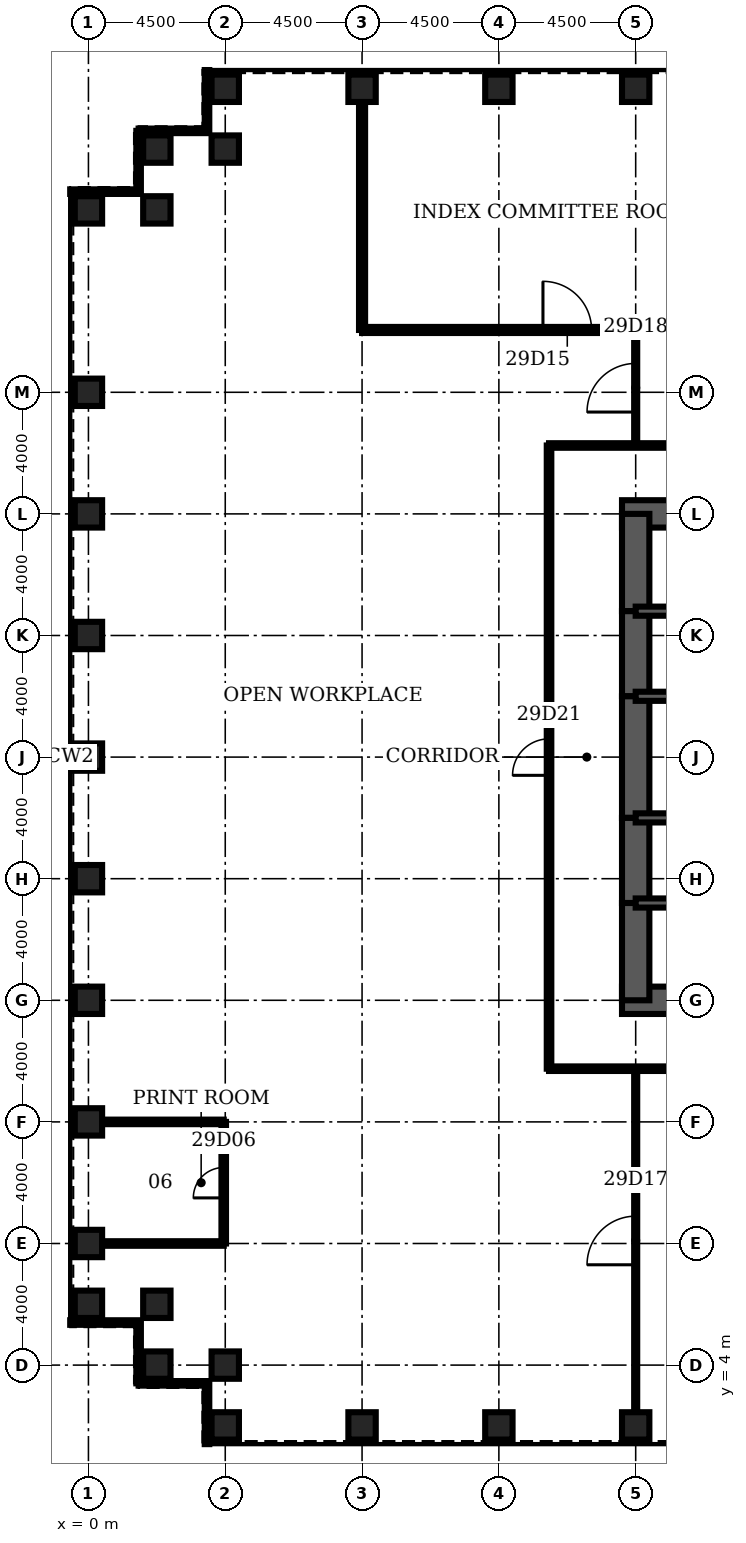
"""IFC4 building model, lengths in metres.
Left out: names, types, materials, properties, quantities, classifications, styles, units other than length and angle.
Written with IfcOpenShell. Run it as: python <this file> out.ifc"""

import sys

from ifc_helpers import new_model, si_unit, direction, frame, frame_2d, origin, origin_2d, place, context, subcontext, project, spatial, rectangle, hollow_rectangle, extrude, element, fill, save


model = new_model("IFC4")
c1 = context("Model", 3, precision=1e-05, world=origin(), true_north=direction((0.0, 1.0)))
c2 = subcontext(c1, "Body", "Model", "MODEL_VIEW")
j1 = project(units=[si_unit("LENGTHUNIT", "METRE"), si_unit("PLANEANGLEUNIT", "RADIAN")], contexts=[c1])
p1 = place(None, origin())
s1 = spatial("IfcSite", under=j1, at=p1, CompositionType="ELEMENT")
p2 = place(p1, origin())
s2 = spatial("IfcBuilding", under=s1, at=p2, CompositionType="ELEMENT")
p3 = place(p2, frame((0.0, 0.0, 134.1)))
s3 = spatial("IfcBuildingStorey", under=s2, at=p3, CompositionType="ELEMENT", Elevation=134.1)
for number, where, z_axis, x_axis in (
    (1, (4.5, 2.0, 0.0), (0.0, 0.0, 1.0), (0.0, 1.0, 0.0)),
    (2, (9.0, 2.0, 0.0), (0.0, 0.0, 1.0), (0.0, 1.0, 0.0)),
    (3, (13.5, 2.0, 0.0), (0.0, 0.0, 1.0), (0.0, 1.0, 0.0)),
    (4, (18.0, 2.0, 0.0), (0.0, 0.0, 1.0), (0.0, 1.0, 0.0)),
    (5, (18.0, 46.0, 0.0), (0.0, 0.0, 1.0), (0.0, 1.0, 0.0)),
    (6, (13.5, 46.0, 0.0), (0.0, 0.0, 1.0), (0.0, 1.0, 0.0)),
    (7, (9.0, 46.0, 0.0), (0.0, 0.0, 1.0), (0.0, 1.0, 0.0)),
    (8, (4.5, 46.0, 0.0), (0.0, 0.0, 1.0), (0.0, 1.0, 0.0)),
    (9, (4.5, 44.0, 0.0), (0.0, 0.0, 1.0), (0.0, 1.0, 0.0)),
    (10, (2.25, 44.0, 0.0), (0.0, 0.0, 1.0), (1.0, 0.0, 0.0)),
    (11, (2.25, 42.0, 0.0), (0.0, 0.0, 1.0), (1.0, 0.0, 0.0)),
    (12, (0.0, 42.0, 0.0), (0.0, 0.0, 1.0), (1.0, 0.0, 0.0)),
    (13, (0.0, 36.0, 0.0), (0.0, 0.0, 1.0), (1.0, 0.0, 0.0)),
    (14, (0.0, 32.0, 0.0), (0.0, 0.0, 1.0), (1.0, 0.0, 0.0)),
    (15, (0.0, 28.0, 0.0), (0.0, 0.0, 1.0), (1.0, 0.0, 0.0)),
    (16, (0.0, 24.0, 0.0), (0.0, 0.0, 1.0), (1.0, 0.0, 0.0)),
    (17, (0.0, 20.0, 0.0), (0.0, 0.0, 1.0), (1.0, 0.0, 0.0)),
    (18, (0.0, 16.0, 0.0), (0.0, 0.0, 1.0), (1.0, 0.0, 0.0)),
    (19, (0.0, 12.0, 0.0), (0.0, 0.0, 1.0), (1.0, 0.0, 0.0)),
    (20, (0.0, 8.0, 0.0), (0.0, 0.0, 1.0), (1.0, 0.0, 0.0)),
    (21, (0.0, 6.0, 0.0), (0.0, 0.0, 1.0), (1.0, 0.0, 0.0)),
    (22, (2.25, 6.0, 0.0), (0.0, 0.0, 1.0), (1.0, 0.0, 0.0)),
    (23, (2.25, 4.0, 0.0), (0.0, 0.0, 1.0), (1.0, 0.0, 0.0)),
    (24, (4.5, 4.0, 0.0), (0.0, 0.0, 1.0), (0.0, 1.0, 0.0)),
):
    element("IfcColumn", number, at=place(p3, frame(where, z_axis=z_axis, x_axis=x_axis)), inside=s3, PredefinedType="COLUMN", context=c2, shape_type="SweptSolid", body=[
        extrude(hollow_rectangle(XDim=0.9, YDim=0.9, WallThickness=0.1, at=origin_2d()), origin(), (0.0, 0.0, 1.0), 4.2),
    ])
for number, where, z_axis, x_axis in (
    (25, (17.55, 16.0, 0.0), (0.0, 0.0, 1.0), (1.0, 0.0, 0.0)),
    (26, (27.0, 32.0, 0.0), (0.0, 0.0, 1.0), (-1.0, 0.0, 0.0)),
):
    element("IfcWall", number, at=place(p3, frame(where, z_axis=z_axis, x_axis=x_axis)), inside=s3, PredefinedType="SHEAR", context=c2, shape_type="SweptSolid", body=[
        extrude(rectangle(XDim=9.45, YDim=0.9, at=frame_2d((4.725, 0.0))), origin(), (0.0, 0.0, 1.0), 4.2),
    ])
p4 = place(p3, frame((18.0, 32.0, 0.0), z_axis=(0.0, 0.0, 1.0), x_axis=(0.0, -1.0, 0.0)))
e27 = element("IfcWall", 27, at=p4, inside=s3, PredefinedType="SHEAR", context=c2, shape_type="SweptSolid", body=[
    extrude(rectangle(XDim=3.2, YDim=0.9, at=frame_2d((1.6, 0.0))), origin(), (0.0, 0.0, 1.0), 4.2),
])
p5 = place(p3, frame((18.0, 28.8, 0.0), z_axis=(0.0, 0.0, 1.0), x_axis=(0.0, -1.0, 0.0)))
e28 = element("IfcWall", 28, at=p5, inside=s3, PredefinedType="SHEAR", context=c2, shape_type="SweptSolid", body=[
    extrude(rectangle(XDim=2.8, YDim=0.9, at=frame_2d((1.4, 0.0))), origin(), (0.0, 0.0, 1.0), 4.2),
])
p6 = place(p5, frame((0.4, 0.0, 0.0)))
e29 = element("IfcOpeningElement", 29, at=p6, cuts=e28, PredefinedType="OPENING", context=c2, shape_type="SweptSolid", body=[
    extrude(rectangle(XDim=1.8, YDim=2.1, at=frame_2d((0.9, 1.05))), frame((0.0, 0.46, 0.0), z_axis=(0.0, -1.0, 0.0), x_axis=(1.0, 0.0, 0.0)), (0.0, 0.0, 1.0), 0.92),
])
p7 = place(p3, frame((18.0, 26.0, 0.0), z_axis=(0.0, 0.0, 1.0), x_axis=(0.0, -1.0, 0.0)))
e30 = element("IfcWall", 30, at=p7, inside=s3, PredefinedType="SHEAR", context=c2, shape_type="SweptSolid", body=[
    extrude(rectangle(XDim=4.0, YDim=0.9, at=frame_2d((2.0, 0.0))), origin(), (0.0, 0.0, 1.0), 4.2),
])
p8 = place(p3, frame((18.0, 22.0, 0.0), z_axis=(0.0, 0.0, 1.0), x_axis=(0.0, -1.0, 0.0)))
e31 = element("IfcWall", 31, at=p8, inside=s3, PredefinedType="SHEAR", context=c2, shape_type="SweptSolid", body=[
    extrude(rectangle(XDim=2.8, YDim=0.9, at=frame_2d((1.4, 0.0))), origin(), (0.0, 0.0, 1.0), 4.2),
])
p9 = place(p8, frame((0.6, 0.0, 0.0)))
e32 = element("IfcOpeningElement", 32, at=p9, cuts=e31, PredefinedType="OPENING", context=c2, shape_type="SweptSolid", body=[
    extrude(rectangle(XDim=1.8, YDim=2.1, at=frame_2d((0.9, 1.05))), frame((0.0, 0.46, 0.0), z_axis=(0.0, -1.0, 0.0), x_axis=(1.0, 0.0, 0.0)), (0.0, 0.0, 1.0), 0.92),
])
p10 = place(p3, frame((18.0, 19.2, 0.0), z_axis=(0.0, 0.0, 1.0), x_axis=(0.0, -1.0, 0.0)))
e33 = element("IfcWall", 33, at=p10, inside=s3, PredefinedType="SHEAR", context=c2, shape_type="SweptSolid", body=[
    extrude(rectangle(XDim=3.2, YDim=0.9, at=frame_2d((1.6, 0.0))), origin(), (0.0, 0.0, 1.0), 4.2),
])
p11 = place(p3, frame((18.0, 19.2, 0.0), z_axis=(0.0, 0.0, 1.0), x_axis=(1.0, 0.0, 0.0)))
e34 = element("IfcWall", 34, at=p11, inside=s3, PredefinedType="SOLIDWALL", context=c2, shape_type="SweptSolid", body=[
    extrude(rectangle(XDim=9.0, YDim=0.3, at=frame_2d((4.5, 0.0))), origin(), (0.0, 0.0, 1.0), 4.2),
])
p12 = place(p11, frame((0.65, 0.0, 0.0)))
e35 = element("IfcOpeningElement", 35, at=p12, cuts=e34, PredefinedType="OPENING", context=c2, shape_type="SweptSolid", body=[
    extrude(rectangle(XDim=1.0, YDim=2.1, at=frame_2d((0.5, 1.05))), frame((0.0, 0.16, 0.0), z_axis=(0.0, -1.0, 0.0), x_axis=(1.0, 0.0, 0.0)), (0.0, 0.0, 1.0), 0.32),
])
p13 = place(p3, frame((18.0, 28.8, 0.0), z_axis=(0.0, 0.0, 1.0), x_axis=(1.0, 0.0, 0.0)))
e36 = element("IfcWall", 36, at=p13, inside=s3, PredefinedType="SOLIDWALL", context=c2, shape_type="SweptSolid", body=[
    extrude(rectangle(XDim=9.0, YDim=0.3, at=frame_2d((4.5, 0.0))), origin(), (0.0, 0.0, 1.0), 4.2),
])
p14 = place(p13, frame((0.65, 0.0, 0.0)))
e37 = element("IfcOpeningElement", 37, at=p14, cuts=e36, PredefinedType="OPENING", context=c2, shape_type="SweptSolid", body=[
    extrude(rectangle(XDim=1.0, YDim=2.1, at=frame_2d((0.5, 1.05))), frame((0.0, 0.16, 0.0), z_axis=(0.0, -1.0, 0.0), x_axis=(1.0, 0.0, 0.0)), (0.0, 0.0, 1.0), 0.32),
])
p15 = place(p3, frame((18.0, 22.0, 0.0), z_axis=(0.0, 0.0, 1.0), x_axis=(1.0, 0.0, 0.0)))
e38 = element("IfcWall", 38, at=p15, inside=s3, PredefinedType="SOLIDWALL", context=c2, shape_type="SweptSolid", body=[
    extrude(rectangle(XDim=6.0, YDim=0.3, at=frame_2d((3.0, 0.0))), origin(), (0.0, 0.0, 1.0), 4.2),
])
p16 = place(p15, frame((4.4, 0.0, 0.0)))
e39 = element("IfcOpeningElement", 39, at=p16, cuts=e38, PredefinedType="OPENING", context=c2, shape_type="SweptSolid", body=[
    extrude(rectangle(XDim=1.0, YDim=2.1, at=frame_2d((0.5, 1.05))), frame((0.0, 0.16, 0.0), z_axis=(0.0, -1.0, 0.0), x_axis=(1.0, 0.0, 0.0)), (0.0, 0.0, 1.0), 0.32),
])
p17 = place(p15, frame((0.7, 0.0, 0.0)))
e40 = element("IfcOpeningElement", 40, at=p17, cuts=e38, PredefinedType="OPENING", context=c2, shape_type="SweptSolid", body=[
    extrude(rectangle(XDim=1.0, YDim=2.1, at=frame_2d((0.5, 1.05))), frame((0.0, 0.16, 0.0), z_axis=(0.0, -1.0, 0.0), x_axis=(1.0, 0.0, 0.0)), (0.0, 0.0, 1.0), 0.32),
])
p18 = place(p3, frame((18.0, 26.0, 0.0), z_axis=(0.0, 0.0, 1.0), x_axis=(1.0, 0.0, 0.0)))
e41 = element("IfcWall", 41, at=p18, inside=s3, PredefinedType="SOLIDWALL", context=c2, shape_type="SweptSolid", body=[
    extrude(rectangle(XDim=6.0, YDim=0.3, at=frame_2d((3.0, 0.0))), origin(), (0.0, 0.0, 1.0), 4.2),
])
for number, where, z_axis, x_axis in (
    (42, (0.45, 8.0, 0.0), (0.0, 0.0, 1.0), (1.0, 0.0, 0.0)),
    (43, (0.45, 12.0, 0.0), (0.0, 0.0, 1.0), (1.0, 0.0, 0.0)),
):
    element("IfcWall", number, at=place(p3, frame(where, z_axis=z_axis, x_axis=x_axis)), inside=s3, PredefinedType="PARTITIONING", context=c2, shape_type="SweptSolid", body=[
        extrude(rectangle(XDim=4.0, YDim=0.15, at=frame_2d((2.0, 0.0))), origin(), (0.0, 0.0, 1.0), 3.0),
    ])
p19 = place(p3, frame((15.15, 13.75, 0.0), z_axis=(0.0, 0.0, 1.0), x_axis=(1.0, 0.0, 0.0)))
e44 = element("IfcWall", 44, at=p19, inside=s3, PredefinedType="PARTITIONING", context=c2, shape_type="SweptSolid", body=[
    extrude(rectangle(XDim=6.85, YDim=0.15, at=frame_2d((3.425, 0.0))), origin(), (0.0, 0.0, 1.0), 3.0),
])
p20 = place(p3, frame((15.15, 34.25, 0.0), z_axis=(0.0, 0.0, 1.0), x_axis=(1.0, 0.0, 0.0)))
e45 = element("IfcWall", 45, at=p20, inside=s3, PredefinedType="PARTITIONING", context=c2, shape_type="SweptSolid", body=[
    extrude(rectangle(XDim=41.7, YDim=0.15, at=frame_2d((20.85, 0.0))), origin(), (0.0, 0.0, 1.0), 3.0),
])
p21 = place(p20, frame((16.225, 0.0, 0.0)))
e46 = element("IfcOpeningElement", 46, at=p21, cuts=e45, PredefinedType="OPENING", context=c2, shape_type="SweptSolid", body=[
    extrude(rectangle(XDim=1.2, YDim=2.1, at=frame_2d((0.6, 1.05))), frame((0.0, 0.085, 0.0), z_axis=(0.0, -1.0, 0.0), x_axis=(1.0, 0.0, 0.0)), (0.0, 0.0, 1.0), 0.17),
])
p22 = place(p3, frame((9.0, 38.05, 0.0), z_axis=(0.0, 0.0, 1.0), x_axis=(1.0, 0.0, 0.0)))
e47 = element("IfcWall", 47, at=p22, inside=s3, PredefinedType="PARTITIONING", context=c2, shape_type="SweptSolid", body=[
    extrude(rectangle(XDim=13.5, YDim=0.2, at=frame_2d((6.75, 0.0))), origin(), (0.0, 0.0, 1.0), 3.0),
])
p23 = place(p22, frame((5.95, 0.0, 0.0)))
e48 = element("IfcOpeningElement", 48, at=p23, cuts=e47, PredefinedType="OPENING", context=c2, shape_type="SweptSolid", body=[
    extrude(rectangle(XDim=1.6, YDim=2.1, at=frame_2d((0.8, 1.05))), frame((0.0, 0.11, 0.0), z_axis=(0.0, -1.0, 0.0), x_axis=(1.0, 0.0, 0.0)), (0.0, 0.0, 1.0), 0.22),
])
p24 = place(p3, frame((4.45, 8.0, 0.0), z_axis=(0.0, 0.0, 1.0), x_axis=(0.0, 1.0, 0.0)))
e49 = element("IfcWall", 49, at=p24, inside=s3, PredefinedType="PARTITIONING", context=c2, shape_type="SweptSolid", body=[
    extrude(rectangle(XDim=4.0, YDim=0.15, at=frame_2d((2.0, 0.0))), origin(), (0.0, 0.0, 1.0), 3.0),
])
p25 = place(p24, frame((1.5, 0.0, 0.0)))
e50 = element("IfcOpeningElement", 50, at=p25, cuts=e49, PredefinedType="OPENING", context=c2, shape_type="SweptSolid", body=[
    extrude(rectangle(XDim=1.0, YDim=2.1, at=frame_2d((0.5, 1.05))), frame((0.0, 0.085, 0.0), z_axis=(0.0, -1.0, 0.0), x_axis=(1.0, 0.0, 0.0)), (0.0, 0.0, 1.0), 0.17),
])
p26 = place(p3, frame((9.0, 38.05, 0.0), z_axis=(0.0, 0.0, 1.0), x_axis=(0.0, 1.0, 0.0)))
e51 = element("IfcWall", 51, at=p26, inside=s3, PredefinedType="PARTITIONING", context=c2, shape_type="SweptSolid", body=[
    extrude(rectangle(XDim=7.5, YDim=0.2, at=frame_2d((3.75, 0.0))), origin(), (0.0, 0.0, 1.0), 3.0),
])
p27 = place(p3, frame((15.15, 13.75, 0.0), z_axis=(0.0, 0.0, 1.0), x_axis=(0.0, 1.0, 0.0)))
e52 = element("IfcWall", 52, at=p27, inside=s3, PredefinedType="PARTITIONING", context=c2, shape_type="SweptSolid", body=[
    extrude(rectangle(XDim=20.5, YDim=0.15, at=frame_2d((10.25, 0.0))), origin(), (0.0, 0.0, 1.0), 3.0),
])
p28 = place(p27, frame((9.65, 0.0, 0.0)))
e53 = element("IfcOpeningElement", 53, at=p28, cuts=e52, PredefinedType="OPENING", context=c2, shape_type="SweptSolid", body=[
    extrude(rectangle(XDim=1.2, YDim=2.1, at=frame_2d((0.6, 1.05))), frame((0.0, 0.085, 0.0), z_axis=(0.0, -1.0, 0.0), x_axis=(1.0, 0.0, 0.0)), (0.0, 0.0, 1.0), 0.17),
])
p29 = place(p3, frame((18.0, 2.45, 0.0), z_axis=(0.0, 0.0, 1.0), x_axis=(0.0, 1.0, 0.0)))
e54 = element("IfcWall", 54, at=p29, inside=s3, PredefinedType="PARTITIONING", context=c2, shape_type="SweptSolid", body=[
    extrude(rectangle(XDim=11.3, YDim=0.1, at=frame_2d((5.65, 0.0))), origin(), (0.0, 0.0, 1.0), 3.0),
])
p30 = place(p29, frame((4.85, 0.0, 0.0)))
e55 = element("IfcOpeningElement", 55, at=p30, cuts=e54, PredefinedType="OPENING", context=c2, shape_type="SweptSolid", body=[
    extrude(rectangle(XDim=1.6, YDim=2.1, at=frame_2d((0.8, 1.05))), frame((0.0, 0.06, 0.0), z_axis=(0.0, -1.0, 0.0), x_axis=(1.0, 0.0, 0.0)), (0.0, 0.0, 1.0), 0.12),
])
p31 = place(p3, frame((18.0, 34.25, 0.0), z_axis=(0.0, 0.0, 1.0), x_axis=(0.0, 1.0, 0.0)))
e56 = element("IfcWall", 56, at=p31, inside=s3, PredefinedType="PARTITIONING", context=c2, shape_type="SweptSolid", body=[
    extrude(rectangle(XDim=3.8, YDim=0.1, at=frame_2d((1.9, 0.0))), origin(), (0.0, 0.0, 1.0), 3.0),
])
p32 = place(p31, frame((1.1, 0.0, 0.0)))
e57 = element("IfcOpeningElement", 57, at=p32, cuts=e56, PredefinedType="OPENING", context=c2, shape_type="SweptSolid", body=[
    extrude(rectangle(XDim=1.6, YDim=2.1, at=frame_2d((0.8, 1.05))), frame((0.0, 0.06, 0.0), z_axis=(0.0, -1.0, 0.0), x_axis=(1.0, 0.0, 0.0)), (0.0, 0.0, 1.0), 0.12),
])
p33 = place(p3, frame((3.9, 46.6, 0.0), z_axis=(0.0, 0.0, 1.0), x_axis=(0.0, -1.0, 0.0)))
e58 = element("IfcWall", 58, at=p33, inside=s3, PredefinedType="ELEMENTEDWALL", context=c2, shape_type="SweptSolid", body=[
    extrude(rectangle(XDim=2.0, YDim=0.15, at=frame_2d((1.0, 0.0))), origin(), (0.0, 0.0, 1.0), 4.04),
])
p34 = place(p3, frame((3.9, 44.6, 0.0), z_axis=(0.0, 0.0, 1.0), x_axis=(-1.0, 0.0, 0.0)))
e59 = element("IfcWall", 59, at=p34, inside=s3, PredefinedType="ELEMENTEDWALL", context=c2, shape_type="SweptSolid", body=[
    extrude(rectangle(XDim=2.25, YDim=0.15, at=frame_2d((1.125, 0.0))), origin(), (0.0, 0.0, 1.0), 4.04),
])
p35 = place(p3, frame((1.65, 44.6, 0.0), z_axis=(0.0, 0.0, 1.0), x_axis=(0.0, -1.0, 0.0)))
e60 = element("IfcWall", 60, at=p35, inside=s3, PredefinedType="ELEMENTEDWALL", context=c2, shape_type="SweptSolid", body=[
    extrude(rectangle(XDim=2.0, YDim=0.15, at=frame_2d((1.0, 0.0))), origin(), (0.0, 0.0, 1.0), 4.04),
])
for number, where, z_axis, x_axis in (
    (61, (1.65, 42.6, 0.0), (0.0, 0.0, 1.0), (-1.0, 0.0, 0.0)),
    (62, (-0.6, 5.4, 0.0), (0.0, 0.0, 1.0), (1.0, 0.0, 0.0)),
):
    element("IfcWall", number, at=place(p3, frame(where, z_axis=z_axis, x_axis=x_axis)), inside=s3, PredefinedType="ELEMENTEDWALL", context=c2, shape_type="SweptSolid", body=[
        extrude(rectangle(XDim=2.25, YDim=0.15, at=frame_2d((1.125, 0.0))), origin(), (0.0, 0.0, 1.0), 4.04),
    ])
p36 = place(p3, frame((1.65, 5.4, 0.0), z_axis=(0.0, 0.0, 1.0), x_axis=(0.0, -1.0, 0.0)))
e63 = element("IfcWall", 63, at=p36, inside=s3, PredefinedType="ELEMENTEDWALL", context=c2, shape_type="SweptSolid", body=[
    extrude(rectangle(XDim=2.0, YDim=0.15, at=frame_2d((1.0, 0.0))), origin(), (0.0, 0.0, 1.0), 4.04),
])
p37 = place(p3, frame((1.65, 3.4, 0.0), z_axis=(0.0, 0.0, 1.0), x_axis=(1.0, 0.0, 0.0)))
e64 = element("IfcWall", 64, at=p37, inside=s3, PredefinedType="ELEMENTEDWALL", context=c2, shape_type="SweptSolid", body=[
    extrude(rectangle(XDim=2.25, YDim=0.15, at=frame_2d((1.125, 0.0))), origin(), (0.0, 0.0, 1.0), 4.04),
])
p38 = place(p3, frame((3.9, 3.4, 0.0), z_axis=(0.0, 0.0, 1.0), x_axis=(0.0, -1.0, 0.0)))
e65 = element("IfcWall", 65, at=p38, inside=s3, PredefinedType="ELEMENTEDWALL", context=c2, shape_type="SweptSolid", body=[
    extrude(rectangle(XDim=2.0, YDim=0.15, at=frame_2d((1.0, 0.0))), origin(), (0.0, 0.0, 1.0), 4.04),
])
p39 = place(p25, origin())
e66 = element("IfcDoor", 66, at=p39, inside=s3, OperationType="SINGLE_SWING_LEFT", PredefinedType="DOOR", context=c2, shape_type="SweptSolid", body=[
    extrude(rectangle(XDim=1.0, YDim=2.1, at=frame_2d((0.5, 1.05))), frame((0.0, 0.025, 0.0), z_axis=(0.0, -1.0, 0.0), x_axis=(1.0, 0.0, 0.0)), (0.0, 0.0, 1.0), 0.05),
])
fill(e50, e66)
p40 = place(p23, origin())
e67 = element("IfcDoor", 67, at=p40, inside=s3, OperationType="SINGLE_SWING_LEFT", PredefinedType="DOOR", context=c2, shape_type="SweptSolid", body=[
    extrude(rectangle(XDim=1.6, YDim=2.1, at=frame_2d((0.8, 1.05))), frame((0.0, 0.025, 0.0), z_axis=(0.0, -1.0, 0.0), x_axis=(1.0, 0.0, 0.0)), (0.0, 0.0, 1.0), 0.05),
])
fill(e48, e67)
p41 = place(p30, origin())
e68 = element("IfcDoor", 68, at=p41, inside=s3, OperationType="SINGLE_SWING_LEFT", PredefinedType="DOOR", context=c2, shape_type="SweptSolid", body=[
    extrude(rectangle(XDim=1.6, YDim=2.1, at=frame_2d((0.8, 1.05))), frame((0.0, 0.025, 0.0), z_axis=(0.0, -1.0, 0.0), x_axis=(1.0, 0.0, 0.0)), (0.0, 0.0, 1.0), 0.05),
])
fill(e55, e68)
p42 = place(p32, origin())
e69 = element("IfcDoor", 69, at=p42, inside=s3, OperationType="SINGLE_SWING_LEFT", PredefinedType="DOOR", context=c2, shape_type="SweptSolid", body=[
    extrude(rectangle(XDim=1.6, YDim=2.1, at=frame_2d((0.8, 1.05))), frame((0.0, 0.025, 0.0), z_axis=(0.0, -1.0, 0.0), x_axis=(1.0, 0.0, 0.0)), (0.0, 0.0, 1.0), 0.05),
])
fill(e57, e69)
p43 = place(p28, origin())
e70 = element("IfcDoor", 70, at=p43, inside=s3, OperationType="SINGLE_SWING_LEFT", PredefinedType="DOOR", context=c2, shape_type="SweptSolid", body=[
    extrude(rectangle(XDim=1.2, YDim=2.1, at=frame_2d((0.6, 1.05))), frame((0.0, 0.025, 0.0), z_axis=(0.0, -1.0, 0.0), x_axis=(1.0, 0.0, 0.0)), (0.0, 0.0, 1.0), 0.05),
])
fill(e53, e70)
p44 = place(p12, origin())
e71 = element("IfcDoor", 71, at=p44, inside=s3, OperationType="SINGLE_SWING_LEFT", PredefinedType="DOOR", context=c2, shape_type="SweptSolid", body=[
    extrude(rectangle(XDim=1.0, YDim=2.1, at=frame_2d((0.5, 1.05))), frame((0.0, 0.025, 0.0), z_axis=(0.0, -1.0, 0.0), x_axis=(1.0, 0.0, 0.0)), (0.0, 0.0, 1.0), 0.05),
])
fill(e35, e71)
p45 = place(p14, origin())
e72 = element("IfcDoor", 72, at=p45, inside=s3, OperationType="SINGLE_SWING_LEFT", PredefinedType="DOOR", context=c2, shape_type="SweptSolid", body=[
    extrude(rectangle(XDim=1.0, YDim=2.1, at=frame_2d((0.5, 1.05))), frame((0.0, 0.025, 0.0), z_axis=(0.0, -1.0, 0.0), x_axis=(1.0, 0.0, 0.0)), (0.0, 0.0, 1.0), 0.05),
])
fill(e37, e72)
p46 = place(p9, origin())
e73 = element("IfcDoor", 73, at=p46, inside=s3, OperationType="SINGLE_SWING_LEFT", PredefinedType="DOOR", context=c2, shape_type="SweptSolid", body=[
    extrude(rectangle(XDim=1.8, YDim=2.1, at=frame_2d((0.9, 1.05))), frame((0.0, 0.45, 0.0), z_axis=(0.0, -1.0, 0.0), x_axis=(1.0, 0.0, 0.0)), (0.0, 0.0, 1.0), 0.899),
])
fill(e32, e73)
p47 = place(p6, origin())
e74 = element("IfcDoor", 74, at=p47, inside=s3, OperationType="SINGLE_SWING_LEFT", PredefinedType="DOOR", context=c2, shape_type="SweptSolid", body=[
    extrude(rectangle(XDim=1.8, YDim=2.1, at=frame_2d((0.9, 1.05))), frame((0.0, 0.45, 0.0), z_axis=(0.0, -1.0, 0.0), x_axis=(1.0, 0.0, 0.0)), (0.0, 0.0, 1.0), 0.899),
])
fill(e29, e74)
p48 = place(p17, origin())
e75 = element("IfcDoor", 75, at=p48, inside=s3, OperationType="SINGLE_SWING_LEFT", PredefinedType="DOOR", context=c2, shape_type="SweptSolid", body=[
    extrude(rectangle(XDim=1.0, YDim=2.1, at=frame_2d((0.5, 1.05))), frame((0.0, 0.025, 0.0), z_axis=(0.0, -1.0, 0.0), x_axis=(1.0, 0.0, 0.0)), (0.0, 0.0, 1.0), 0.05),
])
fill(e40, e75)
save(model, sys.argv[1])
